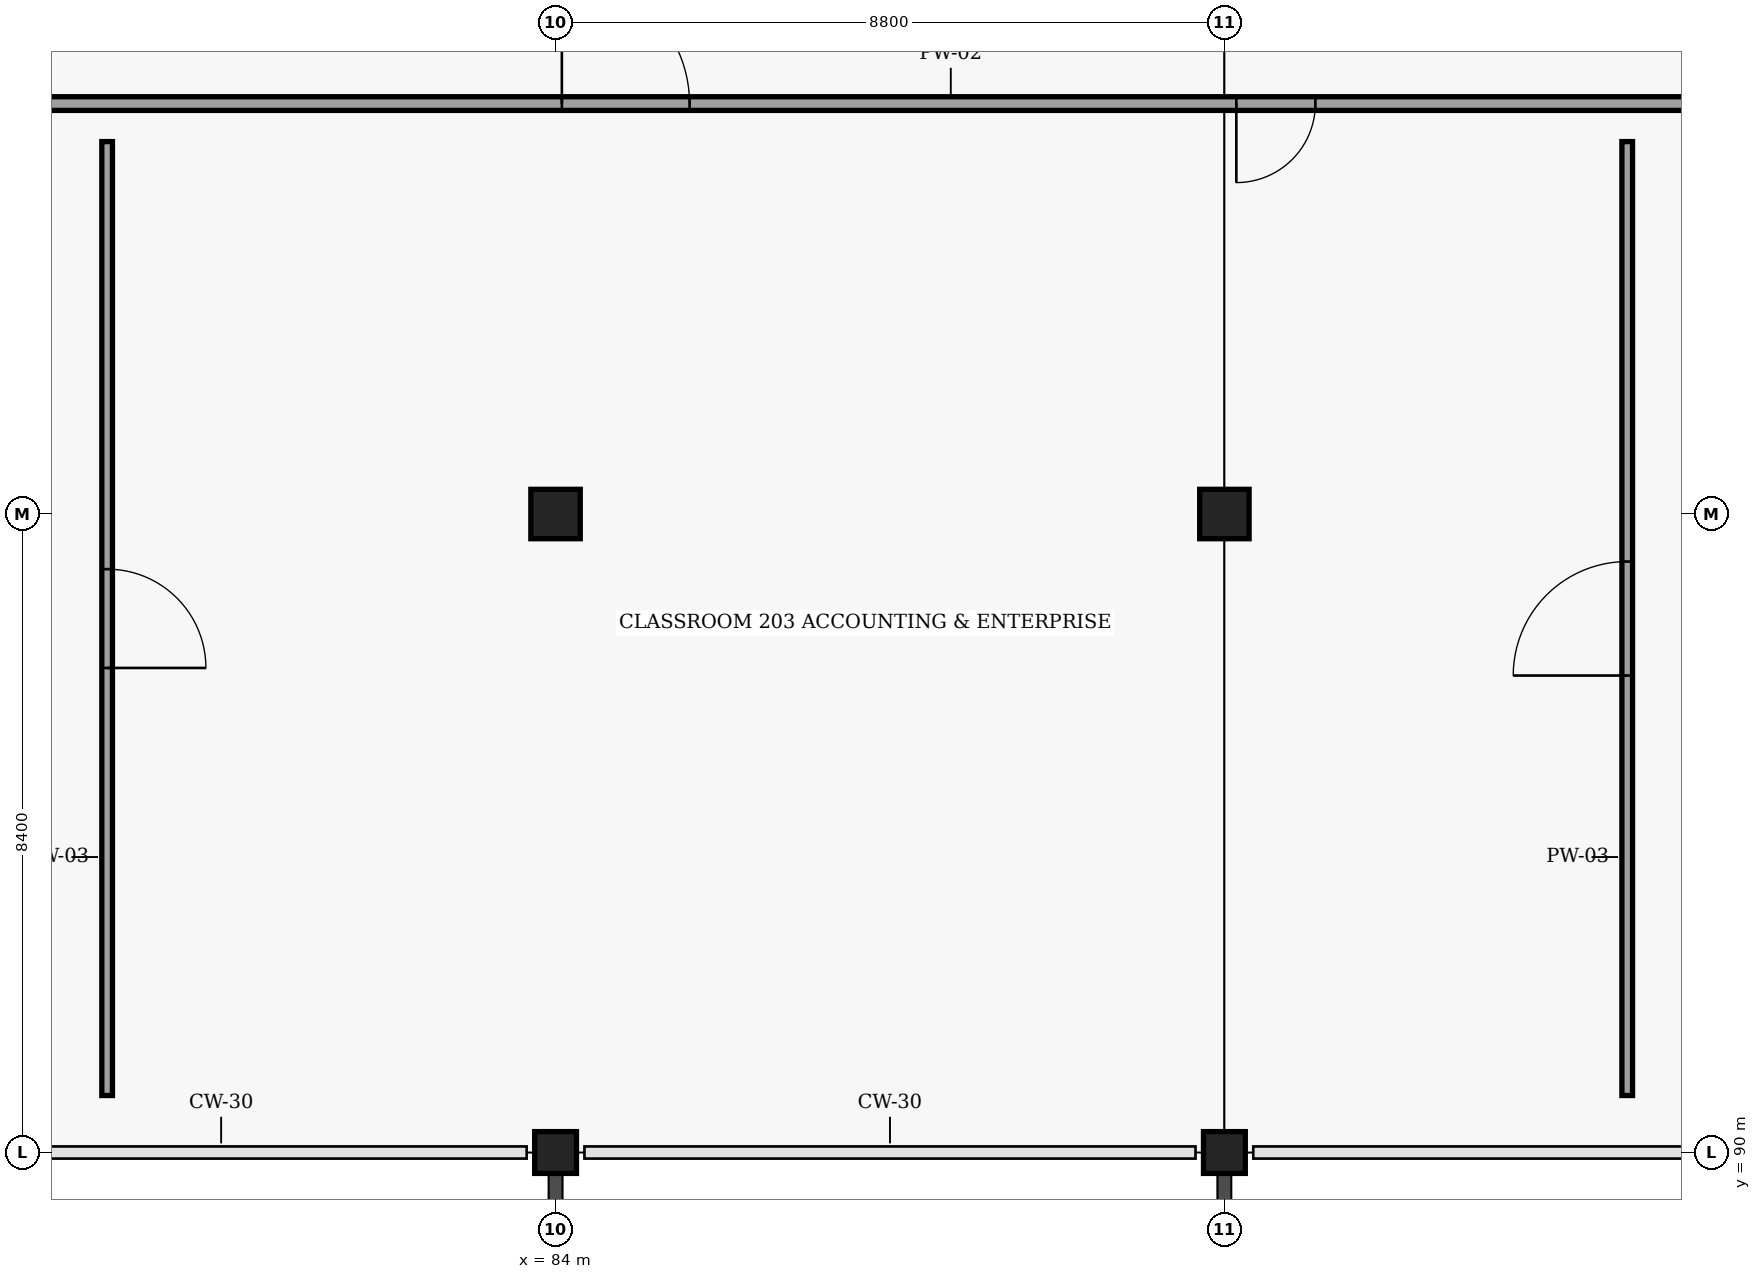
"""IFC4 building model, lengths in metres.
Left out: names, types, materials, properties, quantities, classifications, styles, units other than length and angle.
Written with IfcOpenShell. Run it as: python <this file> out.ifc"""

import sys

from ifc_helpers import new_model, si_unit, direction, frame, frame_2d, origin, origin_2d, place, context, subcontext, project, spatial, rectangle, extrude, element, fill, save


model = new_model("IFC4")
c1 = context("Model", 3, precision=1e-05, world=origin(), true_north=direction((0.0, 1.0)))
c2 = subcontext(c1, "Body", "Model", "MODEL_VIEW")
j1 = project(units=[si_unit("LENGTHUNIT", "METRE"), si_unit("PLANEANGLEUNIT", "RADIAN")], contexts=[c1])
p1 = place(None, origin())
s1 = spatial("IfcSite", under=j1, at=p1, CompositionType="ELEMENT")
p2 = place(p1, origin())
s2 = spatial("IfcBuilding", under=s1, at=p2, CompositionType="ELEMENT")
p3 = place(p2, frame((0.0, 0.0, 9.0)))
s3 = spatial("IfcBuildingStorey", under=s2, at=p3, CompositionType="ELEMENT", Elevation=9.0)
p4 = place(p3, frame((84.0, 90.0, 0.0), z_axis=(0.0, 0.0, 1.0), x_axis=(1.0, 0.0, 0.0)))
e1 = element("IfcColumn", 1, at=p4, inside=s3, PredefinedType="COLUMN", context=c2, shape_type="SweptSolid", body=[
    extrude(rectangle(XDim=0.55, YDim=0.55, at=origin_2d()), origin(), (0.0, 0.0, 1.0), 3.9),
])
p5 = place(p3, frame((84.0, 98.4, 0.0), z_axis=(0.0, 0.0, 1.0), x_axis=(1.0, 0.0, 0.0)))
e2 = element("IfcColumn", 2, at=p5, inside=s3, PredefinedType="COLUMN", context=c2, shape_type="SweptSolid", body=[
    extrude(rectangle(XDim=0.65, YDim=0.65, at=origin_2d()), origin(), (0.0, 0.0, 1.0), 3.9),
])
p6 = place(p3, frame((92.8, 90.0, 0.0), z_axis=(0.0, 0.0, 1.0), x_axis=(1.0, 0.0, 0.0)))
e3 = element("IfcColumn", 3, at=p6, inside=s3, PredefinedType="COLUMN", context=c2, shape_type="SweptSolid", body=[
    extrude(rectangle(XDim=0.55, YDim=0.55, at=origin_2d()), origin(), (0.0, 0.0, 1.0), 3.9),
])
p7 = place(p3, frame((92.8, 98.4, 0.0), z_axis=(0.0, 0.0, 1.0), x_axis=(1.0, 0.0, 0.0)))
e4 = element("IfcColumn", 4, at=p7, inside=s3, PredefinedType="COLUMN", context=c2, shape_type="SweptSolid", body=[
    extrude(rectangle(XDim=0.65, YDim=0.65, at=origin_2d()), origin(), (0.0, 0.0, 1.0), 3.9),
])
p8 = place(p3, frame((42.15, 103.8, 0.0), z_axis=(0.0, 0.0, 1.0), x_axis=(1.0, 0.0, 0.0)))
e5 = element("IfcWall", 5, at=p8, inside=s3, PredefinedType="PARTITIONING", context=c2, shape_type="SweptSolid", body=[
    extrude(rectangle(XDim=94.1, YDim=0.18, at=frame_2d((47.05, 0.0))), origin(), (0.0, 0.0, 1.0), 2.895),
])
p9 = place(p8, frame((7.905, 0.0, 0.0)))
e6 = element("IfcOpeningElement", 6, at=p9, cuts=e5, PredefinedType="OPENING", context=c2, shape_type="SweptSolid", body=[
    extrude(rectangle(XDim=1.3, YDim=2.2, at=frame_2d((0.65, 1.1))), frame((0.0, 0.1, 0.0), z_axis=(0.0, -1.0, 0.0), x_axis=(1.0, 0.0, 0.0)), (0.0, 0.0, 1.0), 0.2),
])
p10 = place(p8, frame((15.459, 0.0, 0.0)))
e7 = element("IfcOpeningElement", 7, at=p10, cuts=e5, PredefinedType="OPENING", context=c2, shape_type="SweptSolid", body=[
    extrude(rectangle(XDim=1.5, YDim=2.25, at=frame_2d((0.75, 1.125))), frame((0.0, 0.1, 0.0), z_axis=(0.0, -1.0, 0.0), x_axis=(1.0, 0.0, 0.0)), (0.0, 0.0, 1.0), 0.2),
])
p11 = place(p8, frame((25.044, 0.0, 0.0)))
e8 = element("IfcOpeningElement", 8, at=p11, cuts=e5, PredefinedType="OPENING", context=c2, shape_type="SweptSolid", body=[
    extrude(rectangle(XDim=1.24, YDim=2.2, at=frame_2d((0.62, 1.1))), frame((0.0, 0.1, 0.0), z_axis=(0.0, -1.0, 0.0), x_axis=(1.0, 0.0, 0.0)), (0.0, 0.0, 1.0), 0.2),
])
p12 = place(p8, frame((33.538, 0.0, 0.0)))
e9 = element("IfcOpeningElement", 9, at=p12, cuts=e5, PredefinedType="OPENING", context=c2, shape_type="SweptSolid", body=[
    extrude(rectangle(XDim=1.36, YDim=2.22, at=frame_2d((0.68, 1.11))), frame((0.0, 0.1, 0.0), z_axis=(0.0, -1.0, 0.0), x_axis=(1.0, 0.0, 0.0)), (0.0, 0.0, 1.0), 0.2),
])
p13 = place(p8, frame((41.933, 0.0, 0.0)))
e10 = element("IfcOpeningElement", 10, at=p13, cuts=e5, PredefinedType="OPENING", context=c2, shape_type="SweptSolid", body=[
    extrude(rectangle(XDim=1.68, YDim=2.26, at=frame_2d((0.84, 1.13))), frame((0.0, 0.1, 0.0), z_axis=(0.0, -1.0, 0.0), x_axis=(1.0, 0.0, 0.0)), (0.0, 0.0, 1.0), 0.2),
])
p14 = place(p8, frame((50.807, 0.0, 0.0)))
e11 = element("IfcOpeningElement", 11, at=p14, cuts=e5, PredefinedType="OPENING", context=c2, shape_type="SweptSolid", body=[
    extrude(rectangle(XDim=1.04, YDim=2.08, at=frame_2d((0.52, 1.04))), frame((0.0, 0.1, 0.0), z_axis=(0.0, -1.0, 0.0), x_axis=(1.0, 0.0, 0.0)), (0.0, 0.0, 1.0), 0.2),
])
p15 = place(p8, frame((58.882, 0.0, 0.0)))
e12 = element("IfcOpeningElement", 12, at=p15, cuts=e5, PredefinedType="OPENING", context=c2, shape_type="SweptSolid", body=[
    extrude(rectangle(XDim=2.0, YDim=2.3, at=frame_2d((1.0, 1.15))), frame((0.0, 0.1, 0.0), z_axis=(0.0, -1.0, 0.0), x_axis=(1.0, 0.0, 0.0)), (0.0, 0.0, 1.0), 0.2),
])
p16 = place(p8, frame((67.511, 0.0, 0.0)))
e13 = element("IfcOpeningElement", 13, at=p16, cuts=e5, PredefinedType="OPENING", context=c2, shape_type="SweptSolid", body=[
    extrude(rectangle(XDim=1.85, YDim=2.22, at=frame_2d((0.925, 1.11))), frame((0.0, 0.1, 0.0), z_axis=(0.0, -1.0, 0.0), x_axis=(1.0, 0.0, 0.0)), (0.0, 0.0, 1.0), 0.2),
])
p17 = place(p8, frame((76.881, 0.0, 0.0)))
e14 = element("IfcOpeningElement", 14, at=p17, cuts=e5, PredefinedType="OPENING", context=c2, shape_type="SweptSolid", body=[
    extrude(rectangle(XDim=1.12, YDim=2.16, at=frame_2d((0.56, 1.08))), frame((0.0, 0.1, 0.0), z_axis=(0.0, -1.0, 0.0), x_axis=(1.0, 0.0, 0.0)), (0.0, 0.0, 1.0), 0.2),
])
p18 = place(p8, frame((85.015, 0.0, 0.0)))
e15 = element("IfcOpeningElement", 15, at=p18, cuts=e5, PredefinedType="OPENING", context=c2, shape_type="SweptSolid", body=[
    extrude(rectangle(XDim=1.06, YDim=2.16, at=frame_2d((0.53, 1.08))), frame((0.0, 0.1, 0.0), z_axis=(0.0, -1.0, 0.0), x_axis=(1.0, 0.0, 0.0)), (0.0, 0.0, 1.0), 0.2),
])
p19 = place(p3, frame((78.1, 90.75, 0.0), z_axis=(0.0, 0.0, 1.0), x_axis=(0.0, 1.0, 0.0)))
e16 = element("IfcWall", 16, at=p19, inside=s3, PredefinedType="PARTITIONING", context=c2, shape_type="SweptSolid", body=[
    extrude(rectangle(XDim=12.55, YDim=0.14, at=frame_2d((6.275, 0.0))), origin(), (0.0, 0.0, 1.0), 2.845),
])
p20 = place(p19, frame((5.625, 0.0, 0.0)))
e17 = element("IfcOpeningElement", 17, at=p20, cuts=e16, PredefinedType="OPENING", context=c2, shape_type="SweptSolid", body=[
    extrude(rectangle(XDim=1.3, YDim=2.2, at=frame_2d((0.65, 1.1))), frame((0.0, 0.08, 0.0), z_axis=(0.0, -1.0, 0.0), x_axis=(1.0, 0.0, 0.0)), (0.0, 0.0, 1.0), 0.16),
])
p21 = place(p3, frame((98.1, 90.75, 0.0), z_axis=(0.0, 0.0, 1.0), x_axis=(0.0, 1.0, 0.0)))
e18 = element("IfcWall", 18, at=p21, inside=s3, PredefinedType="PARTITIONING", context=c2, shape_type="SweptSolid", body=[
    extrude(rectangle(XDim=12.55, YDim=0.14, at=frame_2d((6.275, 0.0))), origin(), (0.0, 0.0, 1.0), 2.845),
])
p22 = place(p21, frame((5.525, 0.0, 0.0)))
e19 = element("IfcOpeningElement", 19, at=p22, cuts=e18, PredefinedType="OPENING", context=c2, shape_type="SweptSolid", body=[
    extrude(rectangle(XDim=1.5, YDim=2.25, at=frame_2d((0.75, 1.125))), frame((0.0, 0.08, 0.0), z_axis=(0.0, -1.0, 0.0), x_axis=(1.0, 0.0, 0.0)), (0.0, 0.0, 1.0), 0.16),
])
p23 = place(p13, origin())
e20 = element("IfcDoor", 20, at=p23, inside=s3, OperationType="DOUBLE_DOOR_SINGLE_SWING", PredefinedType="DOOR", context=c2, shape_type="SweptSolid", body=[
    extrude(rectangle(XDim=1.68, YDim=2.26, at=frame_2d((0.84, 1.13))), frame((0.0, 0.025, 0.0), z_axis=(0.0, -1.0, 0.0), x_axis=(1.0, 0.0, 0.0)), (0.0, 0.0, 1.0), 0.05),
])
fill(e10, e20)
p24 = place(p14, origin())
e21 = element("IfcDoor", 21, at=p24, inside=s3, OperationType="SINGLE_SWING_RIGHT", PredefinedType="DOOR", context=c2, shape_type="SweptSolid", body=[
    extrude(rectangle(XDim=1.04, YDim=2.08, at=frame_2d((0.52, 1.04))), frame((0.0, 0.025, 0.0), z_axis=(0.0, -1.0, 0.0), x_axis=(1.0, 0.0, 0.0)), (0.0, 0.0, 1.0), 0.05),
])
fill(e11, e21)
p25 = place(p20, origin())
e22 = element("IfcDoor", 22, at=p25, inside=s3, OperationType="SINGLE_SWING_RIGHT", PredefinedType="DOOR", context=c2, shape_type="SweptSolid", body=[
    extrude(rectangle(XDim=1.3, YDim=2.2, at=frame_2d((0.65, 1.1))), frame((0.0, 0.025, 0.0), z_axis=(0.0, -1.0, 0.0), x_axis=(1.0, 0.0, 0.0)), (0.0, 0.0, 1.0), 0.05),
])
fill(e17, e22)
p26 = place(p22, origin())
e23 = element("IfcDoor", 23, at=p26, inside=s3, OperationType="DOUBLE_DOOR_SINGLE_SWING", PredefinedType="DOOR", context=c2, shape_type="SweptSolid", body=[
    extrude(rectangle(XDim=1.5, YDim=2.25, at=frame_2d((0.75, 1.125))), frame((0.0, 0.025, 0.0), z_axis=(0.0, -1.0, 0.0), x_axis=(1.0, 0.0, 0.0)), (0.0, 0.0, 1.0), 0.05),
])
fill(e19, e23)
save(model, sys.argv[1])
